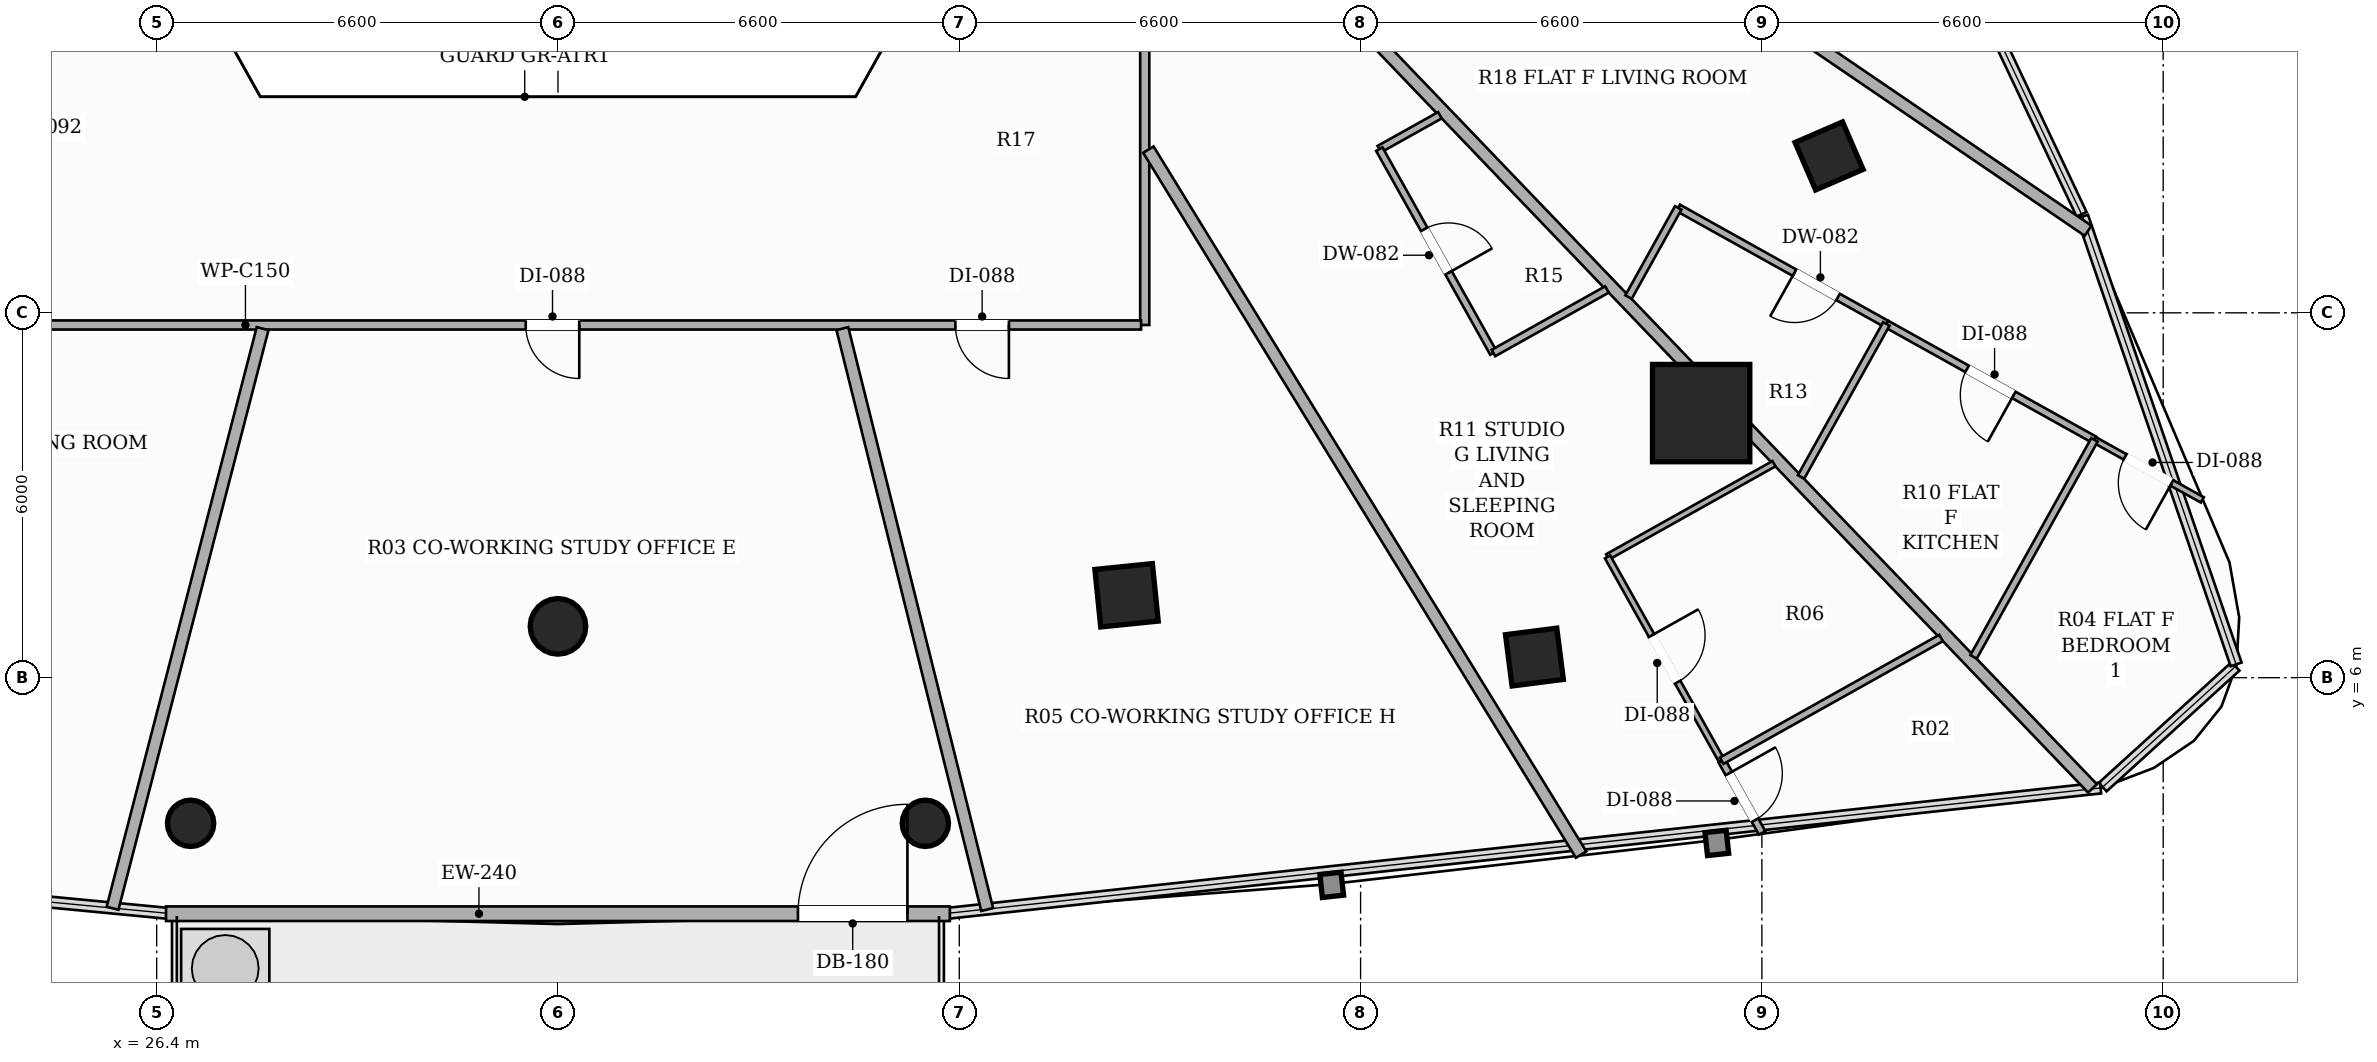
"""IFC4 building model, lengths in metres.
Left out: names, types, materials, properties, quantities, classifications, styles, units other than length and angle.
Written with IfcOpenShell. Run it as: python <this file> out.ifc"""

import sys

from ifc_helpers import new_model, si_unit, direction, frame, frame_2d, origin, origin_2d, place, context, subcontext, project, spatial, rectangle, hollow_rectangle, hollow_circle, extrude, element, fill, save


model = new_model("IFC4")
c1 = context("Model", 3, precision=1e-05, world=origin(), true_north=direction((0.0, 1.0)))
c2 = subcontext(c1, "Body", "Model", "MODEL_VIEW")
j1 = project(units=[si_unit("LENGTHUNIT", "METRE"), si_unit("PLANEANGLEUNIT", "RADIAN")], contexts=[c1])
p1 = place(None, origin())
s1 = spatial("IfcSite", under=j1, at=p1, CompositionType="ELEMENT")
p2 = place(p1, origin())
s2 = spatial("IfcBuilding", under=s1, at=p2, CompositionType="ELEMENT")
p3 = place(p2, frame((0.0, 0.0, 77.45)))
s3 = spatial("IfcBuildingStorey", under=s2, at=p3, CompositionType="ELEMENT", Elevation=77.45)
p4 = place(p3, frame((51.801, 10.351, 0.0), z_axis=(0.0, 0.0, 1.0), x_axis=(1.0, 0.0, 0.0)))
e1 = element("IfcColumn", 1, at=p4, inside=s3, PredefinedType="COLUMN", context=c2, shape_type="SweptSolid", body=[
    extrude(hollow_rectangle(XDim=1.6, YDim=1.6, WallThickness=0.05, at=origin_2d()), origin(), (0.0, 0.0, 1.0), 3.3),
])
p5 = place(p3, frame((33.0, 6.844, 0.0), z_axis=(0.0, 0.0, 1.0), x_axis=(1.0, 0.0, 0.0)))
e2 = element("IfcColumn", 2, at=p5, inside=s3, PredefinedType="COLUMN", context=c2, shape_type="SweptSolid", body=[
    extrude(hollow_circle(Radius=0.457, WallThickness=0.025, at=origin_2d()), origin(), (0.0, 0.0, 1.0), 3.3),
])
p6 = place(p3, frame((42.351, 7.355, 0.0), z_axis=(0.0, 0.0, 1.0), x_axis=(0.994880708829, 0.101056297183, 0.0)))
e3 = element("IfcColumn", 3, at=p6, inside=s3, PredefinedType="COLUMN", context=c2, shape_type="SweptSolid", body=[
    extrude(hollow_rectangle(XDim=0.95, YDim=0.95, WallThickness=0.032, at=origin_2d()), origin(), (0.0, 0.0, 1.0), 3.3),
])
for number, where, z_axis, x_axis in (
    (4, (49.059, 6.339, 0.0), (0.0, 0.0, 1.0), (0.992, 0.127, 0.0)),
    (5, (53.905, 14.58, 0.0), (0.0, 0.0, 1.0), (-0.397, 0.918, 0.0)),
):
    element("IfcColumn", number, at=place(p3, frame(where, z_axis=z_axis, x_axis=x_axis)), inside=s3, PredefinedType="COLUMN", context=c2, shape_type="SweptSolid", body=[
        extrude(hollow_rectangle(XDim=0.85, YDim=0.85, WallThickness=0.028, at=origin_2d()), origin(), (0.0, 0.0, 1.0), 3.3),
    ])
for number, where, z_axis, x_axis in (
    (6, (26.958, 3.605, 0.0), (0.0, 0.0, 1.0), (1.0, 0.0, 0.0)),
    (7, (39.042, 3.605, 0.0), (0.0, 0.0, 1.0), (1.0, 0.0, 0.0)),
):
    element("IfcColumn", number, at=place(p3, frame(where, z_axis=z_axis, x_axis=x_axis)), inside=s3, PredefinedType="COLUMN", context=c2, shape_type="SweptSolid", body=[
        extrude(hollow_circle(Radius=0.381, WallThickness=0.022, at=origin_2d()), origin(), (0.0, 0.0, 1.0), 3.3),
    ])
p7 = place(p3, frame((26.554, 2.118, 0.0), z_axis=(0.0, 0.0, 1.0), x_axis=(1.0, 0.0, 0.0)))
e8 = element("IfcWall", 8, at=p7, inside=s3, PredefinedType="SOLIDWALL", context=c2, shape_type="SweptSolid", body=[
    extrude(rectangle(XDim=12.891, YDim=0.24, at=frame_2d((6.446, 0.0))), origin(), (0.0, 0.0, 1.0), 2.624),
])
p8 = place(p7, frame((10.393, 0.0, 0.0)))
e9 = element("IfcOpeningElement", 9, at=p8, cuts=e8, PredefinedType="OPENING", context=c2, shape_type="SweptSolid", body=[
    extrude(rectangle(XDim=1.8, YDim=2.2, at=frame_2d((0.9, 1.1))), frame((0.0, 0.13, 0.0), z_axis=(0.0, -1.0, 0.0), x_axis=(1.0, 0.0, 0.0)), (0.0, 0.0, 1.0), 0.26),
])
p9 = place(p3, frame((42.65, 36.84, 0.0), z_axis=(0.0, 0.0, 1.0), x_axis=(0.0, -1.0, 0.0)))
e10 = element("IfcWall", 10, at=p9, inside=s3, PredefinedType="PARTITIONING", context=c2, shape_type="SweptSolid", body=[
    extrude(rectangle(XDim=25.04, YDim=0.15, at=frame_2d((12.52, 0.0))), origin(), (0.0, 0.0, 1.0), 2.413),
])
p10 = place(p9, frame((6.171, 0.0, 0.0)))
e11 = element("IfcOpeningElement", 11, at=p10, cuts=e10, PredefinedType="OPENING", context=c2, shape_type="SweptSolid", body=[
    extrude(rectangle(XDim=0.92, YDim=2.15, at=frame_2d((0.46, 1.075))), frame((0.0, 0.085, 0.0), z_axis=(0.0, -1.0, 0.0), x_axis=(1.0, 0.0, 0.0)), (0.0, 0.0, 1.0), 0.17),
])
p11 = place(p9, frame((14.249, 0.0, 0.0)))
e12 = element("IfcOpeningElement", 12, at=p11, cuts=e10, PredefinedType="OPENING", context=c2, shape_type="SweptSolid", body=[
    extrude(rectangle(XDim=0.92, YDim=2.15, at=frame_2d((0.46, 1.075))), frame((0.0, 0.085, 0.0), z_axis=(0.0, -1.0, 0.0), x_axis=(1.0, 0.0, 0.0)), (0.0, 0.0, 1.0), 0.17),
])
p12 = place(p9, frame((18.872, 0.0, 0.0)))
e13 = element("IfcOpeningElement", 13, at=p12, cuts=e10, PredefinedType="OPENING", context=c2, shape_type="SweptSolid", body=[
    extrude(rectangle(XDim=0.92, YDim=2.15, at=frame_2d((0.46, 1.075))), frame((0.0, 0.085, 0.0), z_axis=(0.0, -1.0, 0.0), x_axis=(1.0, 0.0, 0.0)), (0.0, 0.0, 1.0), 0.17),
])
p13 = place(p3, frame((42.59, 11.8, 0.0), z_axis=(0.0, 0.0, 1.0), x_axis=(-1.0, 0.0, 0.0)))
e14 = element("IfcWall", 14, at=p13, inside=s3, PredefinedType="PARTITIONING", context=c2, shape_type="SweptSolid", body=[
    extrude(rectangle(XDim=19.24, YDim=0.15, at=frame_2d((9.62, 0.0))), origin(), (0.0, 0.0, 1.0), 2.669),
])
p14 = place(p13, frame((9.24, 0.0, 0.0)))
e15 = element("IfcOpeningElement", 15, at=p14, cuts=e14, PredefinedType="OPENING", context=c2, shape_type="SweptSolid", body=[
    extrude(rectangle(XDim=0.88, YDim=2.1, at=frame_2d((0.44, 1.05))), frame((0.0, 0.085, 0.0), z_axis=(0.0, -1.0, 0.0), x_axis=(1.0, 0.0, 0.0)), (0.0, 0.0, 1.0), 0.17),
])
p15 = place(p13, frame((2.174, 0.0, 0.0)))
e16 = element("IfcOpeningElement", 16, at=p15, cuts=e14, PredefinedType="OPENING", context=c2, shape_type="SweptSolid", body=[
    extrude(rectangle(XDim=0.88, YDim=2.1, at=frame_2d((0.44, 1.05))), frame((0.0, 0.085, 0.0), z_axis=(0.0, -1.0, 0.0), x_axis=(1.0, 0.0, 0.0)), (0.0, 0.0, 1.0), 0.17),
])
p16 = place(p3, frame((58.165, 13.35, 0.0), z_axis=(0.0, 0.0, 1.0), x_axis=(-0.826341659386, 0.563169123766, 0.0)))
e17 = element("IfcWall", 17, at=p16, inside=s3, PredefinedType="PARTITIONING", context=c2, shape_type="SweptSolid", body=[
    extrude(rectangle(XDim=18.703, YDim=0.2, at=frame_2d((9.352, 0.0))), origin(), (0.0, 0.0, 1.0), 2.413),
])
p17 = place(p3, frame((28.142, 11.74, 0.0), z_axis=(0.0, 0.0, 1.0), x_axis=(-0.250654087156, -0.968076716274, 0.0)))
e18 = element("IfcWall", 18, at=p17, inside=s3, PredefinedType="PARTITIONING", context=c2, shape_type="SweptSolid", body=[
    extrude(rectangle(XDim=9.846, YDim=0.2, at=frame_2d((4.923, 0.0))), origin(), (0.0, 0.0, 1.0), 2.413),
])
p18 = place(p3, frame((37.677, 11.74, 0.0), z_axis=(0.0, 0.0, 1.0), x_axis=(0.241946282122, -0.970289645707, 0.0)))
e19 = element("IfcWall", 19, at=p18, inside=s3, PredefinedType="PARTITIONING", context=c2, shape_type="SweptSolid", body=[
    extrude(rectangle(XDim=9.845, YDim=0.2, at=frame_2d((4.923, 0.0))), origin(), (0.0, 0.0, 1.0), 2.413),
])
p19 = place(p3, frame((58.237, 4.179, 0.0), z_axis=(0.0, 0.0, 1.0), x_axis=(-0.69208567792, 0.721815360337, 0.0)))
e20 = element("IfcWall", 20, at=p19, inside=s3, PredefinedType="PARTITIONING", context=c2, shape_type="SweptSolid", body=[
    extrude(rectangle(XDim=22.435, YDim=0.2, at=frame_2d((11.218, 0.0))), origin(), (0.0, 0.0, 1.0), 2.413),
])
p20 = place(p3, frame((49.827, 3.09, 0.0), z_axis=(0.0, 0.0, 1.0), x_axis=(-0.523146880199, 0.852242536921, 0.0)))
e21 = element("IfcWall", 21, at=p20, inside=s3, PredefinedType="PARTITIONING", context=c2, shape_type="SweptSolid", body=[
    extrude(rectangle(XDim=13.604, YDim=0.2, at=frame_2d((6.802, 0.0))), origin(), (0.0, 0.0, 1.0), 2.413),
])
p21 = place(p3, frame((54.847, 11.818, 0.0), z_axis=(0.0, 0.0, 1.0), x_axis=(-0.87346578699, 0.486885529624, 0.0)))
e22 = element("IfcWall", 22, at=p21, inside=s3, PredefinedType="PARTITIONING", context=c2, shape_type="SweptSolid", body=[
    extrude(rectangle(XDim=3.919, YDim=0.12, at=frame_2d((1.959, 0.0))), origin(), (0.0, 0.0, 1.0), 2.413),
])
p22 = place(p21, frame((0.91, 0.0, 0.0)))
e23 = element("IfcOpeningElement", 23, at=p22, cuts=e22, PredefinedType="OPENING", context=c2, shape_type="SweptSolid", body=[
    extrude(rectangle(XDim=0.82, YDim=2.1, at=frame_2d((0.41, 1.05))), frame((0.0, 0.07, 0.0), z_axis=(0.0, -1.0, 0.0), x_axis=(1.0, 0.0, 0.0)), (0.0, 0.0, 1.0), 0.14),
])
p23 = place(p3, frame((51.424, 13.726, 0.0), z_axis=(0.0, 0.0, 1.0), x_axis=(-0.486605473044, -0.873621836726, 0.0)))
e24 = element("IfcWall", 24, at=p23, inside=s3, PredefinedType="PARTITIONING", context=c2, shape_type="SweptSolid", body=[
    extrude(rectangle(XDim=1.679, YDim=0.12, at=frame_2d((0.84, 0.0))), origin(), (0.0, 0.0, 1.0), 2.413),
])
p24 = place(p3, frame((58.27, 9.911, 0.0), z_axis=(0.0, 0.0, 1.0), x_axis=(-0.873560029318, 0.486716421727, 0.0)))
e25 = element("IfcWall", 25, at=p24, inside=s3, PredefinedType="PARTITIONING", context=c2, shape_type="SweptSolid", body=[
    extrude(rectangle(XDim=3.918, YDim=0.12, at=frame_2d((1.959, 0.0))), origin(), (0.0, 0.0, 1.0), 2.619),
])
p25 = place(p24, frame((1.519, 0.0, 0.0)))
e26 = element("IfcOpeningElement", 26, at=p25, cuts=e25, PredefinedType="OPENING", context=c2, shape_type="SweptSolid", body=[
    extrude(rectangle(XDim=0.88, YDim=2.1, at=frame_2d((0.44, 1.05))), frame((0.0, 0.07, 0.0), z_axis=(0.0, -1.0, 0.0), x_axis=(1.0, 0.0, 0.0)), (0.0, 0.0, 1.0), 0.14),
])
p26 = place(p3, frame((60.044, 8.923, 0.0), z_axis=(0.0, 0.0, 1.0), x_axis=(-0.873680423781, 0.486500274514, 0.0)))
e27 = element("IfcWall", 27, at=p26, inside=s3, PredefinedType="PARTITIONING", context=c2, shape_type="SweptSolid", body=[
    extrude(rectangle(XDim=2.031, YDim=0.1, at=frame_2d((1.015, 0.0))), origin(), (0.0, 0.0, 1.0), 3.06),
])
p27 = place(p26, frame((0.575, 0.0, 0.0)))
e28 = element("IfcOpeningElement", 28, at=p27, cuts=e27, PredefinedType="OPENING", context=c2, shape_type="SweptSolid", body=[
    extrude(rectangle(XDim=0.88, YDim=2.1, at=frame_2d((0.44, 1.05))), frame((0.0, 0.06, 0.0), z_axis=(0.0, -1.0, 0.0), x_axis=(1.0, 0.0, 0.0)), (0.0, 0.0, 1.0), 0.12),
])
p28 = place(p3, frame((54.847, 11.818, 0.0), z_axis=(0.0, 0.0, 1.0), x_axis=(-0.486822226103, -0.873501070504, 0.0)))
e29 = element("IfcWall", 29, at=p28, inside=s3, PredefinedType="PARTITIONING", context=c2, shape_type="SweptSolid", body=[
    extrude(rectangle(XDim=2.882, YDim=0.12, at=frame_2d((1.441, 0.0))), origin(), (0.0, 0.0, 1.0), 3.06),
])
p29 = place(p3, frame((58.27, 9.911, 0.0), z_axis=(0.0, 0.0, 1.0), x_axis=(-0.486824622959, -0.873499734677, 0.0)))
e30 = element("IfcWall", 30, at=p29, inside=s3, PredefinedType="PARTITIONING", context=c2, shape_type="SweptSolid", body=[
    extrude(rectangle(XDim=4.086, YDim=0.12, at=frame_2d((2.043, 0.0))), origin(), (0.0, 0.0, 1.0), 3.06),
])
p30 = place(p3, frame((47.505, 15.249, 0.0), z_axis=(0.0, 0.0, 1.0), x_axis=(-0.872914025969, -0.487874064967, 0.0)))
e31 = element("IfcWall", 31, at=p30, inside=s3, PredefinedType="PARTITIONING", context=c2, shape_type="SweptSolid", body=[
    extrude(rectangle(XDim=1.142, YDim=0.12, at=frame_2d((0.571, 0.0))), origin(), (0.0, 0.0, 1.0), 3.06),
])
p31 = place(p3, frame((46.508, 14.692, 0.0), z_axis=(0.0, 0.0, 1.0), x_axis=(0.488483407483, -0.872573183529, 0.0)))
e32 = element("IfcWall", 32, at=p31, inside=s3, PredefinedType="PARTITIONING", context=c2, shape_type="SweptSolid", body=[
    extrude(rectangle(XDim=3.843, YDim=0.12, at=frame_2d((1.921, 0.0))), origin(), (0.0, 0.0, 1.0), 3.06),
])
p32 = place(p31, frame((1.511, 0.0, 0.0)))
e33 = element("IfcOpeningElement", 33, at=p32, cuts=e32, PredefinedType="OPENING", context=c2, shape_type="SweptSolid", body=[
    extrude(rectangle(XDim=0.82, YDim=2.1, at=frame_2d((0.41, 1.05))), frame((0.0, 0.07, 0.0), z_axis=(0.0, -1.0, 0.0), x_axis=(1.0, 0.0, 0.0)), (0.0, 0.0, 1.0), 0.14),
])
p33 = place(p3, frame((48.385, 11.339, 0.0), z_axis=(0.0, 0.0, 1.0), x_axis=(0.872618854318, 0.488401817246, 0.0)))
e34 = element("IfcWall", 34, at=p33, inside=s3, PredefinedType="PARTITIONING", context=c2, shape_type="SweptSolid", body=[
    extrude(rectangle(XDim=2.139, YDim=0.12, at=frame_2d((1.07, 0.0))), origin(), (0.0, 0.0, 1.0), 2.413),
])
p34 = place(p3, frame((52.139, 4.634, 0.0), z_axis=(0.0, 0.0, 1.0), x_axis=(0.488778203453, -0.872408085605, 0.0)))
e35 = element("IfcWall", 35, at=p34, inside=s3, PredefinedType="PARTITIONING", context=c2, shape_type="SweptSolid", body=[
    extrude(rectangle(XDim=1.361, YDim=0.12, at=frame_2d((0.68, 0.0))), origin(), (0.0, 0.0, 1.0), 2.619),
])
p35 = place(p34, frame((0.24, 0.0, 0.0)))
e36 = element("IfcOpeningElement", 36, at=p35, cuts=e35, PredefinedType="OPENING", context=c2, shape_type="SweptSolid", body=[
    extrude(rectangle(XDim=0.88, YDim=2.1, at=frame_2d((0.44, 1.05))), frame((0.0, 0.07, 0.0), z_axis=(0.0, -1.0, 0.0), x_axis=(1.0, 0.0, 0.0)), (0.0, 0.0, 1.0), 0.14),
])
p36 = place(p3, frame((52.999, 9.519, 0.0), z_axis=(0.0, 0.0, 1.0), x_axis=(-0.87247814598, -0.488653133406, 0.0)))
e37 = element("IfcWall", 37, at=p36, inside=s3, PredefinedType="PARTITIONING", context=c2, shape_type="SweptSolid", body=[
    extrude(rectangle(XDim=3.137, YDim=0.1, at=frame_2d((1.569, 0.0))), origin(), (0.0, 0.0, 1.0), 2.413),
])
p37 = place(p3, frame((50.262, 7.986, 0.0), z_axis=(0.0, 0.0, 1.0), x_axis=(0.488564666262, -0.872527688317, 0.0)))
e38 = element("IfcWall", 38, at=p37, inside=s3, PredefinedType="PARTITIONING", context=c2, shape_type="SweptSolid", body=[
    extrude(rectangle(XDim=3.842, YDim=0.1, at=frame_2d((1.921, 0.0))), origin(), (0.0, 0.0, 1.0), 2.413),
])
p38 = place(p37, frame((1.481, 0.0, 0.0)))
e39 = element("IfcOpeningElement", 39, at=p38, cuts=e38, PredefinedType="OPENING", context=c2, shape_type="SweptSolid", body=[
    extrude(rectangle(XDim=0.88, YDim=2.1, at=frame_2d((0.44, 1.05))), frame((0.0, 0.06, 0.0), z_axis=(0.0, -1.0, 0.0), x_axis=(1.0, 0.0, 0.0)), (0.0, 0.0, 1.0), 0.12),
])
p39 = place(p3, frame((52.139, 4.634, 0.0), z_axis=(0.0, 0.0, 1.0), x_axis=(0.87266304729, 0.488322850064, 0.0)))
e40 = element("IfcWall", 40, at=p39, inside=s3, PredefinedType="PARTITIONING", context=c2, shape_type="SweptSolid", body=[
    extrude(rectangle(XDim=4.135, YDim=0.12, at=frame_2d((2.067, 0.0))), origin(), (0.0, 0.0, 1.0), 2.619),
])
p40 = place(p8, origin())
e41 = element("IfcDoor", 41, at=p40, inside=s3, OperationType="SINGLE_SWING_RIGHT", PredefinedType="DOOR", context=c2, shape_type="SweptSolid", body=[
    extrude(rectangle(XDim=1.8, YDim=2.2, at=frame_2d((0.9, 1.1))), frame((0.0, 0.025, 0.0), z_axis=(0.0, -1.0, 0.0), x_axis=(1.0, 0.0, 0.0)), (0.0, 0.0, 1.0), 0.05),
])
fill(e9, e41)
p41 = place(p14, origin())
e42 = element("IfcDoor", 42, at=p41, inside=s3, OperationType="SINGLE_SWING_LEFT", PredefinedType="DOOR", context=c2, shape_type="SweptSolid", body=[
    extrude(rectangle(XDim=0.88, YDim=2.1, at=frame_2d((0.44, 1.05))), frame((0.0, 0.025, 0.0), z_axis=(0.0, -1.0, 0.0), x_axis=(1.0, 0.0, 0.0)), (0.0, 0.0, 1.0), 0.05),
])
fill(e15, e42)
p42 = place(p22, origin())
e43 = element("IfcDoor", 43, at=p42, inside=s3, OperationType="SINGLE_SWING_RIGHT", PredefinedType="DOOR", context=c2, shape_type="SweptSolid", body=[
    extrude(rectangle(XDim=0.82, YDim=2.1, at=frame_2d((0.41, 1.05))), frame((0.0, 0.025, 0.0), z_axis=(0.0, -1.0, 0.0), x_axis=(1.0, 0.0, 0.0)), (0.0, 0.0, 1.0), 0.05),
])
fill(e23, e43)
p43 = place(p25, origin())
e44 = element("IfcDoor", 44, at=p43, inside=s3, OperationType="SINGLE_SWING_LEFT", PredefinedType="DOOR", context=c2, shape_type="SweptSolid", body=[
    extrude(rectangle(XDim=0.88, YDim=2.1, at=frame_2d((0.44, 1.05))), frame((0.0, 0.025, 0.0), z_axis=(0.0, -1.0, 0.0), x_axis=(1.0, 0.0, 0.0)), (0.0, 0.0, 1.0), 0.05),
])
fill(e26, e44)
p44 = place(p27, origin())
e45 = element("IfcDoor", 45, at=p44, inside=s3, OperationType="SINGLE_SWING_LEFT", PredefinedType="DOOR", context=c2, shape_type="SweptSolid", body=[
    extrude(rectangle(XDim=0.88, YDim=2.1, at=frame_2d((0.44, 1.05))), frame((0.0, 0.025, 0.0), z_axis=(0.0, -1.0, 0.0), x_axis=(1.0, 0.0, 0.0)), (0.0, 0.0, 1.0), 0.05),
])
fill(e28, e45)
p45 = place(p32, origin())
e46 = element("IfcDoor", 46, at=p45, inside=s3, OperationType="SINGLE_SWING_RIGHT", PredefinedType="DOOR", context=c2, shape_type="SweptSolid", body=[
    extrude(rectangle(XDim=0.82, YDim=2.1, at=frame_2d((0.41, 1.05))), frame((0.0, 0.025, 0.0), z_axis=(0.0, -1.0, 0.0), x_axis=(1.0, 0.0, 0.0)), (0.0, 0.0, 1.0), 0.05),
])
fill(e33, e46)
p46 = place(p35, origin())
e47 = element("IfcDoor", 47, at=p46, inside=s3, OperationType="SINGLE_SWING_LEFT", PredefinedType="DOOR", context=c2, shape_type="SweptSolid", body=[
    extrude(rectangle(XDim=0.88, YDim=2.1, at=frame_2d((0.44, 1.05))), frame((0.0, 0.025, 0.0), z_axis=(0.0, -1.0, 0.0), x_axis=(1.0, 0.0, 0.0)), (0.0, 0.0, 1.0), 0.05),
])
fill(e36, e47)
p47 = place(p38, origin())
e48 = element("IfcDoor", 48, at=p47, inside=s3, OperationType="SINGLE_SWING_LEFT", PredefinedType="DOOR", context=c2, shape_type="SweptSolid", body=[
    extrude(rectangle(XDim=0.88, YDim=2.1, at=frame_2d((0.44, 1.05))), frame((0.0, 0.025, 0.0), z_axis=(0.0, -1.0, 0.0), x_axis=(1.0, 0.0, 0.0)), (0.0, 0.0, 1.0), 0.05),
])
fill(e39, e48)
p48 = place(p15, origin())
e49 = element("IfcDoor", 49, at=p48, inside=s3, OperationType="SINGLE_SWING_LEFT", PredefinedType="DOOR", context=c2, shape_type="SweptSolid", body=[
    extrude(rectangle(XDim=0.88, YDim=2.1, at=frame_2d((0.44, 1.05))), frame((0.0, 0.025, 0.0), z_axis=(0.0, -1.0, 0.0), x_axis=(1.0, 0.0, 0.0)), (0.0, 0.0, 1.0), 0.05),
])
fill(e16, e49)
save(model, sys.argv[1])
